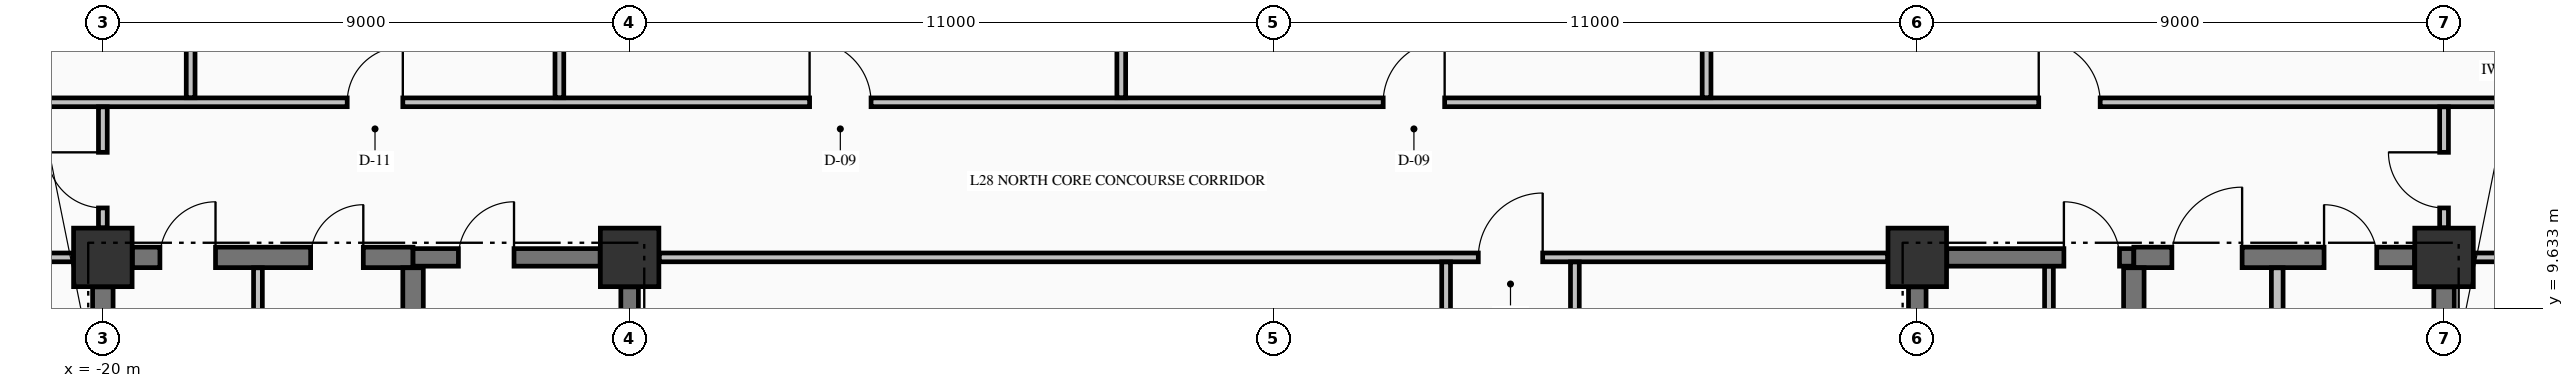
"""IFC4 building model, lengths in metres.
Left out: names, types, materials, properties, quantities, classifications, styles, units other than length and angle.
Written with IfcOpenShell. Run it as: python <this file> out.ifc"""

import sys

from ifc_helpers import new_model, si_unit, direction, frame, frame_2d, origin, origin_2d, place, context, subcontext, project, spatial, rectangle, extrude, element, fill, save


model = new_model("IFC4")
c1 = context("Model", 3, precision=1e-05, world=origin(), true_north=direction((0.0, 1.0)))
c2 = subcontext(c1, "Body", "Model", "MODEL_VIEW")
j1 = project(units=[si_unit("LENGTHUNIT", "METRE"), si_unit("PLANEANGLEUNIT", "RADIAN")], contexts=[c1])
p1 = place(None, origin())
s1 = spatial("IfcSite", under=j1, at=p1, CompositionType="ELEMENT")
p2 = place(p1, origin())
s2 = spatial("IfcBuilding", under=s1, at=p2, CompositionType="ELEMENT")
p3 = place(p2, frame((0.0, 0.0, 112.78)))
s3 = spatial("IfcBuildingStorey", under=s2, at=p3, CompositionType="ELEMENT", Elevation=112.78)
for number, where, z_axis, x_axis in (
    (1, (-20.0, 10.5, -0.25), (0.0, 0.0, 1.0), (1.0, 0.0, 0.0)),
    (2, (-11.0, 10.5, -0.25), (0.0, 0.0, 1.0), (1.0, 0.0, 0.0)),
    (3, (11.0, 10.5, -0.25), (0.0, 0.0, 1.0), (1.0, 0.0, 0.0)),
    (4, (20.0, 10.5, -0.25), (0.0, 0.0, 1.0), (1.0, 0.0, 0.0)),
):
    element("IfcColumn", number, at=place(p3, frame(where, z_axis=z_axis, x_axis=x_axis)), inside=s3, PredefinedType="COLUMN", context=c2, shape_type="SweptSolid", body=[
        extrude(rectangle(XDim=1.0, YDim=1.0, at=origin_2d()), origin(), (0.0, 0.0, 1.0), 3.395),
    ])
p4 = place(p3, frame((-19.496, 10.5, 0.0), z_axis=(0.0, 0.0, 1.0), x_axis=(1.0, 0.0, 0.0)))
e5 = element("IfcWall", 5, at=p4, inside=s3, PredefinedType="SHEAR", context=c2, shape_type="SweptSolid", body=[
    extrude(rectangle(XDim=4.796, YDim=0.35, at=frame_2d((2.398, 0.0))), origin(), (0.0, 0.0, 1.0), 3.145),
])
p5 = place(p4, frame((0.471, 0.0, 0.0)))
e6 = element("IfcOpeningElement", 6, at=p5, cuts=e5, PredefinedType="OPENING", context=c2, shape_type="SweptSolid", body=[
    extrude(rectangle(XDim=0.95, YDim=2.15, at=frame_2d((0.475, 1.075))), frame((0.0, 0.185, 0.0), z_axis=(0.0, -1.0, 0.0), x_axis=(1.0, 0.0, 0.0)), (0.0, 0.0, 1.0), 0.37),
])
p6 = place(p4, frame((3.046, 0.0, 0.0)))
e7 = element("IfcOpeningElement", 7, at=p6, cuts=e5, PredefinedType="OPENING", context=c2, shape_type="SweptSolid", body=[
    extrude(rectangle(XDim=0.9, YDim=2.15, at=frame_2d((0.45, 1.075))), frame((0.0, 0.185, 0.0), z_axis=(0.0, -1.0, 0.0), x_axis=(1.0, 0.0, 0.0)), (0.0, 0.0, 1.0), 0.37),
])
p7 = place(p3, frame((-14.7, 10.5, 0.0), z_axis=(0.0, 0.0, 1.0), x_axis=(1.0, 0.0, 0.0)))
e8 = element("IfcWall", 8, at=p7, inside=s3, PredefinedType="SHEAR", context=c2, shape_type="SweptSolid", body=[
    extrude(rectangle(XDim=3.196, YDim=0.3, at=frame_2d((1.598, 0.0))), origin(), (0.0, 0.0, 1.0), 3.145),
])
p8 = place(p7, frame((0.775, 0.0, 0.0)))
e9 = element("IfcOpeningElement", 9, at=p8, cuts=e8, PredefinedType="OPENING", context=c2, shape_type="SweptSolid", body=[
    extrude(rectangle(XDim=0.95, YDim=2.15, at=frame_2d((0.475, 1.075))), frame((0.0, 0.16, 0.0), z_axis=(0.0, -1.0, 0.0), x_axis=(1.0, 0.0, 0.0)), (0.0, 0.0, 1.0), 0.32),
])
p9 = place(p3, frame((11.504, 10.5, 0.0), z_axis=(0.0, 0.0, 1.0), x_axis=(1.0, 0.0, 0.0)))
e10 = element("IfcWall", 10, at=p9, inside=s3, PredefinedType="SHEAR", context=c2, shape_type="SweptSolid", body=[
    extrude(rectangle(XDim=3.196, YDim=0.3, at=frame_2d((1.598, 0.0))), origin(), (0.0, 0.0, 1.0), 3.145),
])
p10 = place(p9, frame((2.001, 0.0, 0.0)))
e11 = element("IfcOpeningElement", 11, at=p10, cuts=e10, PredefinedType="OPENING", context=c2, shape_type="SweptSolid", body=[
    extrude(rectangle(XDim=0.95, YDim=2.15, at=frame_2d((0.475, 1.075))), frame((0.0, 0.16, 0.0), z_axis=(0.0, -1.0, 0.0), x_axis=(1.0, 0.0, 0.0)), (0.0, 0.0, 1.0), 0.32),
])
p11 = place(p3, frame((14.7, 10.5, 0.0), z_axis=(0.0, 0.0, 1.0), x_axis=(1.0, 0.0, 0.0)))
e12 = element("IfcWall", 12, at=p11, inside=s3, PredefinedType="SHEAR", context=c2, shape_type="SweptSolid", body=[
    extrude(rectangle(XDim=4.796, YDim=0.35, at=frame_2d((2.398, 0.0))), origin(), (0.0, 0.0, 1.0), 3.145),
])
p12 = place(p11, frame((0.65, 0.0, 0.0)))
e13 = element("IfcOpeningElement", 13, at=p12, cuts=e12, PredefinedType="OPENING", context=c2, shape_type="SweptSolid", body=[
    extrude(rectangle(XDim=1.2, YDim=2.15, at=frame_2d((0.6, 1.075))), frame((0.0, 0.185, 0.0), z_axis=(0.0, -1.0, 0.0), x_axis=(1.0, 0.0, 0.0)), (0.0, 0.0, 1.0), 0.37),
])
p13 = place(p11, frame((3.25, 0.0, 0.0)))
e14 = element("IfcOpeningElement", 14, at=p13, cuts=e12, PredefinedType="OPENING", context=c2, shape_type="SweptSolid", body=[
    extrude(rectangle(XDim=0.9, YDim=2.15, at=frame_2d((0.45, 1.075))), frame((0.0, 0.185, 0.0), z_axis=(0.0, -1.0, 0.0), x_axis=(1.0, 0.0, 0.0)), (0.0, 0.0, 1.0), 0.37),
])
p14 = place(p3, frame((-22.835, 10.5, 0.0), z_axis=(0.0, 0.0, 1.0), x_axis=(1.0, 0.0, 0.0)))
e15 = element("IfcWall", 15, at=p14, inside=s3, PredefinedType="PARTITIONING", context=c2, shape_type="SweptSolid", body=[
    extrude(rectangle(XDim=2.329, YDim=0.15, at=frame_2d((1.165, 0.0))), origin(), (0.0, 0.0, 1.0), 3.145),
])
p15 = place(p14, frame((0.86, 0.0, 0.0)))
e16 = element("IfcOpeningElement", 16, at=p15, cuts=e15, PredefinedType="OPENING", context=c2, shape_type="SweptSolid", body=[
    extrude(rectangle(XDim=0.95, YDim=2.15, at=frame_2d((0.475, 1.075))), frame((0.0, 0.085, 0.0), z_axis=(0.0, -1.0, 0.0), x_axis=(1.0, 0.0, 0.0)), (0.0, 0.0, 1.0), 0.17),
])
p16 = place(p3, frame((-10.494, 10.5, 0.0), z_axis=(0.0, 0.0, 1.0), x_axis=(1.0, 0.0, 0.0)))
e17 = element("IfcWall", 17, at=p16, inside=s3, PredefinedType="PARTITIONING", context=c2, shape_type="SweptSolid", body=[
    extrude(rectangle(XDim=20.988, YDim=0.15, at=frame_2d((10.494, 0.0))), origin(), (0.0, 0.0, 1.0), 3.145),
])
p17 = place(p16, frame((13.994, 0.0, 0.0)))
e18 = element("IfcOpeningElement", 18, at=p17, cuts=e17, PredefinedType="OPENING", context=c2, shape_type="SweptSolid", body=[
    extrude(rectangle(XDim=1.1, YDim=2.15, at=frame_2d((0.55, 1.075))), frame((0.0, 0.085, 0.0), z_axis=(0.0, -1.0, 0.0), x_axis=(1.0, 0.0, 0.0)), (0.0, 0.0, 1.0), 0.17),
])
p18 = place(p3, frame((20.506, 10.5, 0.0), z_axis=(0.0, 0.0, 1.0), x_axis=(1.0, 0.0, 0.0)))
e19 = element("IfcWall", 19, at=p18, inside=s3, PredefinedType="PARTITIONING", context=c2, shape_type="SweptSolid", body=[
    extrude(rectangle(XDim=7.329, YDim=0.15, at=frame_2d((3.665, 0.0))), origin(), (0.0, 0.0, 1.0), 3.145),
])
p19 = place(p18, frame((2.994, 0.0, 0.0)))
e20 = element("IfcOpeningElement", 20, at=p19, cuts=e19, PredefinedType="OPENING", context=c2, shape_type="SweptSolid", body=[
    extrude(rectangle(XDim=1.0, YDim=2.15, at=frame_2d((0.5, 1.075))), frame((0.0, 0.085, 0.0), z_axis=(0.0, -1.0, 0.0), x_axis=(1.0, 0.0, 0.0)), (0.0, 0.0, 1.0), 0.17),
])
p20 = place(p3, frame((-22.835, 13.15, 0.0), z_axis=(0.0, 0.0, 1.0), x_axis=(1.0, 0.0, 0.0)))
e21 = element("IfcWall", 21, at=p20, inside=s3, PredefinedType="PARTITIONING", context=c2, shape_type="SweptSolid", body=[
    extrude(rectangle(XDim=50.67, YDim=0.15, at=frame_2d((25.335, 0.0))), origin(), (0.0, 0.0, 1.0), 3.145),
])
p21 = place(p20, frame((7.01, 0.0, 0.0)))
e22 = element("IfcOpeningElement", 22, at=p21, cuts=e21, PredefinedType="OPENING", context=c2, shape_type="SweptSolid", body=[
    extrude(rectangle(XDim=0.95, YDim=2.15, at=frame_2d((0.475, 1.075))), frame((0.0, 0.085, 0.0), z_axis=(0.0, -1.0, 0.0), x_axis=(1.0, 0.0, 0.0)), (0.0, 0.0, 1.0), 0.17),
])
p22 = place(p20, frame((14.91, 0.0, 0.0)))
e23 = element("IfcOpeningElement", 23, at=p22, cuts=e21, PredefinedType="OPENING", context=c2, shape_type="SweptSolid", body=[
    extrude(rectangle(XDim=1.05, YDim=2.15, at=frame_2d((0.525, 1.075))), frame((0.0, 0.085, 0.0), z_axis=(0.0, -1.0, 0.0), x_axis=(1.0, 0.0, 0.0)), (0.0, 0.0, 1.0), 0.17),
])
p23 = place(p20, frame((24.71, 0.0, 0.0)))
e24 = element("IfcOpeningElement", 24, at=p23, cuts=e21, PredefinedType="OPENING", context=c2, shape_type="SweptSolid", body=[
    extrude(rectangle(XDim=1.05, YDim=2.15, at=frame_2d((0.525, 1.075))), frame((0.0, 0.085, 0.0), z_axis=(0.0, -1.0, 0.0), x_axis=(1.0, 0.0, 0.0)), (0.0, 0.0, 1.0), 0.17),
])
p24 = place(p20, frame((35.91, 0.0, 0.0)))
e25 = element("IfcOpeningElement", 25, at=p24, cuts=e21, PredefinedType="OPENING", context=c2, shape_type="SweptSolid", body=[
    extrude(rectangle(XDim=1.05, YDim=2.15, at=frame_2d((0.525, 1.075))), frame((0.0, 0.085, 0.0), z_axis=(0.0, -1.0, 0.0), x_axis=(1.0, 0.0, 0.0)), (0.0, 0.0, 1.0), 0.17),
])
p25 = place(p3, frame((-20.0, 0.504, 0.0), z_axis=(0.0, 0.0, 1.0), x_axis=(0.0, 1.0, 0.0)))
e26 = element("IfcWall", 26, at=p25, inside=s3, PredefinedType="SHEAR", context=c2, shape_type="SweptSolid", body=[
    extrude(rectangle(XDim=9.492, YDim=0.35, at=frame_2d((4.746, 0.0))), origin(), (0.0, 0.0, 1.0), 3.145),
])
p26 = place(p3, frame((-14.7, 5.852, 0.0), z_axis=(0.0, 0.0, 1.0), x_axis=(0.0, 1.0, 0.0)))
e27 = element("IfcWall", 27, at=p26, inside=s3, PredefinedType="SHEAR", context=c2, shape_type="SweptSolid", body=[
    extrude(rectangle(XDim=4.471, YDim=0.35, at=frame_2d((2.235, 0.0))), origin(), (0.0, 0.0, 1.0), 3.145),
])
for number, where, z_axis, x_axis in (
    (28, (-11.0, 5.852, 0.0), (0.0, 0.0, 1.0), (0.0, 1.0, 0.0)),
    (29, (11.0, 5.852, 0.0), (0.0, 0.0, 1.0), (0.0, 1.0, 0.0)),
):
    element("IfcWall", number, at=place(p3, frame(where, z_axis=z_axis, x_axis=x_axis)), inside=s3, PredefinedType="SHEAR", context=c2, shape_type="SweptSolid", body=[
        extrude(rectangle(XDim=4.144, YDim=0.3, at=frame_2d((2.072, 0.0))), origin(), (0.0, 0.0, 1.0), 3.145),
    ])
p27 = place(p3, frame((14.7, 5.852, 0.0), z_axis=(0.0, 0.0, 1.0), x_axis=(0.0, 1.0, 0.0)))
e30 = element("IfcWall", 30, at=p27, inside=s3, PredefinedType="SHEAR", context=c2, shape_type="SweptSolid", body=[
    extrude(rectangle(XDim=4.471, YDim=0.35, at=frame_2d((2.235, 0.0))), origin(), (0.0, 0.0, 1.0), 3.145),
])
p28 = place(p3, frame((20.0, 5.377, 0.0), z_axis=(0.0, 0.0, 1.0), x_axis=(0.0, 1.0, 0.0)))
e31 = element("IfcWall", 31, at=p28, inside=s3, PredefinedType="SHEAR", context=c2, shape_type="SweptSolid", body=[
    extrude(rectangle(XDim=4.619, YDim=0.35, at=frame_2d((2.31, 0.0))), origin(), (0.0, 0.0, 1.0), 3.145),
])
p29 = place(p3, frame((-20.0, 11.006, 0.0), z_axis=(0.0, 0.0, 1.0), x_axis=(0.0, 1.0, 0.0)))
e32 = element("IfcWall", 32, at=p29, inside=s3, PredefinedType="PARTITIONING", context=c2, shape_type="SweptSolid", body=[
    extrude(rectangle(XDim=2.066, YDim=0.15, at=frame_2d((1.033, 0.0))), origin(), (0.0, 0.0, 1.0), 2.635),
])
p30 = place(p29, frame((0.339, 0.0, 0.0)))
e33 = element("IfcOpeningElement", 33, at=p30, cuts=e32, PredefinedType="OPENING", context=c2, shape_type="SweptSolid", body=[
    extrude(rectangle(XDim=0.95, YDim=2.15, at=frame_2d((0.475, 1.075))), frame((0.0, 0.085, 0.0), z_axis=(0.0, -1.0, 0.0), x_axis=(1.0, 0.0, 0.0)), (0.0, 0.0, 1.0), 0.17),
])
p31 = place(p3, frame((-18.5, 13.228, 0.0), z_axis=(0.0, 0.0, 1.0), x_axis=(0.0, 1.0, 0.0)))
e34 = element("IfcWall", 34, at=p31, inside=s3, PredefinedType="PARTITIONING", context=c2, shape_type="SweptSolid", body=[
    extrude(rectangle(XDim=7.166, YDim=0.15, at=frame_2d((3.583, 0.0))), origin(), (0.0, 0.0, 1.0), 3.145),
])
p32 = place(p3, frame((-17.35, 5.178, 0.0), z_axis=(0.0, 0.0, 1.0), x_axis=(0.0, 1.0, 0.0)))
e35 = element("IfcWall", 35, at=p32, inside=s3, PredefinedType="PARTITIONING", context=c2, shape_type="SweptSolid", body=[
    extrude(rectangle(XDim=5.144, YDim=0.15, at=frame_2d((2.572, 0.0))), origin(), (0.0, 0.0, 1.0), 3.145),
])
for number, where, z_axis, x_axis in (
    (36, (-12.2, 13.228, 0.0), (0.0, 0.0, 1.0), (0.0, 1.0, 0.0)),
    (37, (-2.6, 13.228, 0.0), (0.0, 0.0, 1.0), (0.0, 1.0, 0.0)),
):
    element("IfcWall", number, at=place(p3, frame(where, z_axis=z_axis, x_axis=x_axis)), inside=s3, PredefinedType="PARTITIONING", context=c2, shape_type="SweptSolid", body=[
        extrude(rectangle(XDim=12.107, YDim=0.15, at=frame_2d((6.053, 0.0))), origin(), (0.0, 0.0, 1.0), 3.145),
    ])
for number, where, z_axis, x_axis in (
    (38, (2.95, 2.978, 0.0), (0.0, 0.0, 1.0), (0.0, 1.0, 0.0)),
    (39, (5.15, 2.978, 0.0), (0.0, 0.0, 1.0), (0.0, 1.0, 0.0)),
):
    element("IfcWall", number, at=place(p3, frame(where, z_axis=z_axis, x_axis=x_axis)), inside=s3, PredefinedType="PARTITIONING", context=c2, shape_type="SweptSolid", body=[
        extrude(rectangle(XDim=7.444, YDim=0.15, at=frame_2d((3.722, 0.0))), origin(), (0.0, 0.0, 1.0), 3.145),
    ])
p33 = place(p3, frame((7.4, 13.228, 0.0), z_axis=(0.0, 0.0, 1.0), x_axis=(0.0, 1.0, 0.0)))
e40 = element("IfcWall", 40, at=p33, inside=s3, PredefinedType="PARTITIONING", context=c2, shape_type="SweptSolid", body=[
    extrude(rectangle(XDim=12.107, YDim=0.15, at=frame_2d((6.053, 0.0))), origin(), (0.0, 0.0, 1.0), 3.145),
])
p34 = place(p3, frame((13.25, 5.853, 0.0), z_axis=(0.0, 0.0, 1.0), x_axis=(0.0, 1.0, 0.0)))
e41 = element("IfcWall", 41, at=p34, inside=s3, PredefinedType="PARTITIONING", context=c2, shape_type="SweptSolid", body=[
    extrude(rectangle(XDim=4.494, YDim=0.15, at=frame_2d((2.247, 0.0))), origin(), (0.0, 0.0, 1.0), 3.145),
])
p35 = place(p34, frame((1.472, 0.0, 0.0)))
e42 = element("IfcOpeningElement", 42, at=p35, cuts=e41, PredefinedType="OPENING", context=c2, shape_type="SweptSolid", body=[
    extrude(rectangle(XDim=0.95, YDim=2.15, at=frame_2d((0.475, 1.075))), frame((0.0, 0.085, 0.0), z_axis=(0.0, -1.0, 0.0), x_axis=(1.0, 0.0, 0.0)), (0.0, 0.0, 1.0), 0.17),
])
p36 = place(p3, frame((17.15, 5.378, 0.0), z_axis=(0.0, 0.0, 1.0), x_axis=(0.0, 1.0, 0.0)))
e43 = element("IfcWall", 43, at=p36, inside=s3, PredefinedType="PARTITIONING", context=c2, shape_type="SweptSolid", body=[
    extrude(rectangle(XDim=4.944, YDim=0.2, at=frame_2d((2.472, 0.0))), origin(), (0.0, 0.0, 1.0), 3.145),
])
p37 = place(p3, frame((20.0, 11.006, 0.0), z_axis=(0.0, 0.0, 1.0), x_axis=(0.0, 1.0, 0.0)))
e44 = element("IfcWall", 44, at=p37, inside=s3, PredefinedType="PARTITIONING", context=c2, shape_type="SweptSolid", body=[
    extrude(rectangle(XDim=2.066, YDim=0.15, at=frame_2d((1.033, 0.0))), origin(), (0.0, 0.0, 1.0), 2.635),
])
p38 = place(p37, frame((0.339, 0.0, 0.0)))
e45 = element("IfcOpeningElement", 45, at=p38, cuts=e44, PredefinedType="OPENING", context=c2, shape_type="SweptSolid", body=[
    extrude(rectangle(XDim=0.95, YDim=2.15, at=frame_2d((0.475, 1.075))), frame((0.0, 0.085, 0.0), z_axis=(0.0, -1.0, 0.0), x_axis=(1.0, 0.0, 0.0)), (0.0, 0.0, 1.0), 0.17),
])
p39 = place(p8, origin())
e46 = element("IfcDoor", 46, at=p39, inside=s3, OperationType="SINGLE_SWING_RIGHT", PredefinedType="DOOR", context=c2, shape_type="SweptSolid", body=[
    extrude(rectangle(XDim=0.95, YDim=2.15, at=frame_2d((0.475, 1.075))), frame((0.0, 0.025, 0.0), z_axis=(0.0, -1.0, 0.0), x_axis=(1.0, 0.0, 0.0)), (0.0, 0.0, 1.0), 0.05),
])
fill(e9, e46)
p40 = place(p10, origin())
e47 = element("IfcDoor", 47, at=p40, inside=s3, OperationType="SINGLE_SWING_LEFT", PredefinedType="DOOR", context=c2, shape_type="SweptSolid", body=[
    extrude(rectangle(XDim=0.95, YDim=2.15, at=frame_2d((0.475, 1.075))), frame((0.0, 0.025, 0.0), z_axis=(0.0, -1.0, 0.0), x_axis=(1.0, 0.0, 0.0)), (0.0, 0.0, 1.0), 0.05),
])
fill(e11, e47)
p41 = place(p5, origin())
e48 = element("IfcDoor", 48, at=p41, inside=s3, OperationType="SINGLE_SWING_RIGHT", PredefinedType="DOOR", context=c2, shape_type="SweptSolid", body=[
    extrude(rectangle(XDim=0.95, YDim=2.15, at=frame_2d((0.475, 1.075))), frame((0.0, 0.025, 0.0), z_axis=(0.0, -1.0, 0.0), x_axis=(1.0, 0.0, 0.0)), (0.0, 0.0, 1.0), 0.05),
])
fill(e6, e48)
p42 = place(p6, origin())
e49 = element("IfcDoor", 49, at=p42, inside=s3, OperationType="SINGLE_SWING_RIGHT", PredefinedType="DOOR", context=c2, shape_type="SweptSolid", body=[
    extrude(rectangle(XDim=0.9, YDim=2.15, at=frame_2d((0.45, 1.075))), frame((0.0, 0.025, 0.0), z_axis=(0.0, -1.0, 0.0), x_axis=(1.0, 0.0, 0.0)), (0.0, 0.0, 1.0), 0.05),
])
fill(e7, e49)
p43 = place(p12, origin())
e50 = element("IfcDoor", 50, at=p43, inside=s3, OperationType="SINGLE_SWING_RIGHT", PredefinedType="DOOR", context=c2, shape_type="SweptSolid", body=[
    extrude(rectangle(XDim=1.2, YDim=2.15, at=frame_2d((0.6, 1.075))), frame((0.0, 0.025, 0.0), z_axis=(0.0, -1.0, 0.0), x_axis=(1.0, 0.0, 0.0)), (0.0, 0.0, 1.0), 0.05),
])
fill(e13, e50)
p44 = place(p13, origin())
e51 = element("IfcDoor", 51, at=p44, inside=s3, OperationType="SINGLE_SWING_LEFT", PredefinedType="DOOR", context=c2, shape_type="SweptSolid", body=[
    extrude(rectangle(XDim=0.9, YDim=2.15, at=frame_2d((0.45, 1.075))), frame((0.0, 0.025, 0.0), z_axis=(0.0, -1.0, 0.0), x_axis=(1.0, 0.0, 0.0)), (0.0, 0.0, 1.0), 0.05),
])
fill(e14, e51)
p45 = place(p17, origin())
e52 = element("IfcDoor", 52, at=p45, inside=s3, OperationType="SINGLE_SWING_RIGHT", PredefinedType="DOOR", context=c2, shape_type="SweptSolid", body=[
    extrude(rectangle(XDim=1.1, YDim=2.15, at=frame_2d((0.55, 1.075))), frame((0.0, 0.025, 0.0), z_axis=(0.0, -1.0, 0.0), x_axis=(1.0, 0.0, 0.0)), (0.0, 0.0, 1.0), 0.05),
])
fill(e18, e52)
p46 = place(p21, origin())
e53 = element("IfcDoor", 53, at=p46, inside=s3, OperationType="SINGLE_SWING_RIGHT", PredefinedType="DOOR", context=c2, shape_type="SweptSolid", body=[
    extrude(rectangle(XDim=0.95, YDim=2.15, at=frame_2d((0.475, 1.075))), frame((0.0, 0.025, 0.0), z_axis=(0.0, -1.0, 0.0), x_axis=(1.0, 0.0, 0.0)), (0.0, 0.0, 1.0), 0.05),
])
fill(e22, e53)
p47 = place(p22, origin())
e54 = element("IfcDoor", 54, at=p47, inside=s3, OperationType="SINGLE_SWING_LEFT", PredefinedType="DOOR", context=c2, shape_type="SweptSolid", body=[
    extrude(rectangle(XDim=1.05, YDim=2.15, at=frame_2d((0.525, 1.075))), frame((0.0, 0.025, 0.0), z_axis=(0.0, -1.0, 0.0), x_axis=(1.0, 0.0, 0.0)), (0.0, 0.0, 1.0), 0.05),
])
fill(e23, e54)
p48 = place(p23, origin())
e55 = element("IfcDoor", 55, at=p48, inside=s3, OperationType="SINGLE_SWING_RIGHT", PredefinedType="DOOR", context=c2, shape_type="SweptSolid", body=[
    extrude(rectangle(XDim=1.05, YDim=2.15, at=frame_2d((0.525, 1.075))), frame((0.0, 0.025, 0.0), z_axis=(0.0, -1.0, 0.0), x_axis=(1.0, 0.0, 0.0)), (0.0, 0.0, 1.0), 0.05),
])
fill(e24, e55)
p49 = place(p24, origin())
e56 = element("IfcDoor", 56, at=p49, inside=s3, OperationType="SINGLE_SWING_LEFT", PredefinedType="DOOR", context=c2, shape_type="SweptSolid", body=[
    extrude(rectangle(XDim=1.05, YDim=2.15, at=frame_2d((0.525, 1.075))), frame((0.0, 0.025, 0.0), z_axis=(0.0, -1.0, 0.0), x_axis=(1.0, 0.0, 0.0)), (0.0, 0.0, 1.0), 0.05),
])
fill(e25, e56)
p50 = place(p30, origin())
e57 = element("IfcDoor", 57, at=p50, inside=s3, OperationType="SINGLE_SWING_RIGHT", PredefinedType="DOOR", context=c2, shape_type="SweptSolid", body=[
    extrude(rectangle(XDim=0.95, YDim=2.15, at=frame_2d((0.475, 1.075))), frame((0.0, 0.025, 0.0), z_axis=(0.0, -1.0, 0.0), x_axis=(1.0, 0.0, 0.0)), (0.0, 0.0, 1.0), 0.05),
])
fill(e33, e57)
p51 = place(p38, origin())
e58 = element("IfcDoor", 58, at=p51, inside=s3, OperationType="SINGLE_SWING_RIGHT", PredefinedType="DOOR", context=c2, shape_type="SweptSolid", body=[
    extrude(rectangle(XDim=0.95, YDim=2.15, at=frame_2d((0.475, 1.075))), frame((0.0, 0.025, 0.0), z_axis=(0.0, -1.0, 0.0), x_axis=(1.0, 0.0, 0.0)), (0.0, 0.0, 1.0), 0.05),
])
fill(e45, e58)
save(model, sys.argv[1])
